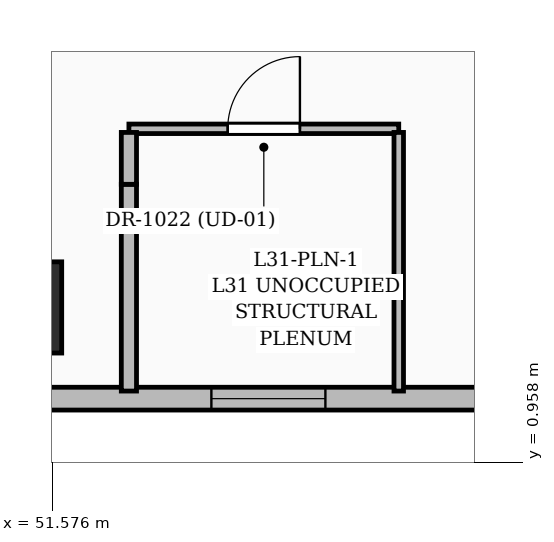
"""IFC4 building model, lengths in metres.
Left out: names, types, materials, properties, quantities, classifications, styles, units other than length and angle.
Written with IfcOpenShell. Run it as: python <this file> out.ifc"""

import sys

from ifc_helpers import new_model, si_unit, direction, frame, frame_2d, origin, origin_2d, place, context, subcontext, project, spatial, rectangle, extrude, element, fill, save


model = new_model("IFC4")
c1 = context("Model", 3, precision=1e-05, world=origin(), true_north=direction((0.0, 1.0)))
c2 = subcontext(c1, "Body", "Model", "MODEL_VIEW")
j1 = project(units=[si_unit("LENGTHUNIT", "METRE"), si_unit("PLANEANGLEUNIT", "RADIAN")], contexts=[c1])
p1 = place(None, origin())
s1 = spatial("IfcSite", under=j1, at=p1, CompositionType="ELEMENT")
p2 = place(p1, origin())
s2 = spatial("IfcBuilding", under=s1, at=p2, CompositionType="ELEMENT")
p3 = place(p2, frame((0.0, 0.0, 124.8)))
s3 = spatial("IfcBuildingStorey", under=s2, at=p3, CompositionType="ELEMENT", Elevation=124.8)
p4 = place(p3, frame((51.096, 3.0, 0.0), z_axis=(0.0, 0.0, 1.0), x_axis=(1.0, 0.0, 0.0)))
e1 = element("IfcColumn", 1, at=p4, inside=s3, PredefinedType="COLUMN", context=c2, shape_type="SweptSolid", body=[
    extrude(rectangle(XDim=1.2, YDim=1.2, at=origin_2d()), origin(), (0.0, 0.0, 1.0), 3.6),
])
p5 = place(p3, frame((56.73, 12.137, 0.0), z_axis=(0.0, 0.0, 1.0), x_axis=(0.506362293691, -0.86232083793, 0.0)))
e2 = element("IfcWall", 2, at=p5, inside=s3, PredefinedType="SOLIDWALL", context=c2, shape_type="SweptSolid", body=[
    extrude(rectangle(XDim=8.127, YDim=0.3, at=frame_2d((4.064, 0.0))), origin(), (0.0, 0.0, 1.0), 3.35),
])
p6 = place(p5, frame((2.925, 0.0, 0.8)))
e3 = element("IfcOpeningElement", 3, at=p6, cuts=e2, PredefinedType="OPENING", context=c2, shape_type="SweptSolid", body=[
    extrude(rectangle(XDim=1.2, YDim=1.8, at=frame_2d((0.6, 0.9))), frame((0.0, 0.16, 0.0), z_axis=(0.0, -1.0, 0.0), x_axis=(1.0, 0.0, 0.0)), (0.0, 0.0, 1.0), 0.32),
])
p7 = place(p3, frame((58.345, 1.8, 0.0), z_axis=(0.0, 0.0, 1.0), x_axis=(-1.0, 0.0, 0.0)))
e4 = element("IfcWall", 4, at=p7, inside=s3, PredefinedType="SOLIDWALL", context=c2, shape_type="SweptSolid", body=[
    extrude(rectangle(XDim=7.604, YDim=0.3, at=frame_2d((3.802, 0.0))), origin(), (0.0, 0.0, 1.0), 3.35),
])
p8 = place(p7, frame((3.18, 0.0, 0.6)))
e5 = element("IfcOpeningElement", 5, at=p8, cuts=e4, PredefinedType="OPENING", context=c2, shape_type="SweptSolid", body=[
    extrude(rectangle(XDim=1.5, YDim=2.1, at=frame_2d((0.75, 1.05))), frame((0.0, 0.16, 0.0), z_axis=(0.0, -1.0, 0.0), x_axis=(1.0, 0.0, 0.0)), (0.0, 0.0, 1.0), 0.32),
])
p9 = place(p3, frame((52.58, 5.35, 0.0), z_axis=(0.0, 0.0, 1.0), x_axis=(1.0, 0.0, 0.0)))
e6 = element("IfcWall", 6, at=p9, inside=s3, PredefinedType="PARTITIONING", context=c2, shape_type="SweptSolid", body=[
    extrude(rectangle(XDim=3.55, YDim=0.125, at=frame_2d((1.775, 0.0))), origin(), (0.0, 0.0, 1.0), 2.57),
])
p10 = place(p9, frame((1.3, 0.0, 0.0)))
e7 = element("IfcOpeningElement", 7, at=p10, cuts=e6, PredefinedType="OPENING", context=c2, shape_type="SweptSolid", body=[
    extrude(rectangle(XDim=0.95, YDim=2.2, at=frame_2d((0.475, 1.1))), frame((0.0, 0.072, 0.0), z_axis=(0.0, -1.0, 0.0), x_axis=(1.0, 0.0, 0.0)), (0.0, 0.0, 1.0), 0.145),
])
p11 = place(p3, frame((56.13, 1.9, 0.0), z_axis=(0.0, 0.0, 1.0), x_axis=(0.0, 1.0, 0.0)))
e8 = element("IfcWall", 8, at=p11, inside=s3, PredefinedType="PARTITIONING", context=c2, shape_type="SweptSolid", body=[
    extrude(rectangle(XDim=3.403, YDim=0.125, at=frame_2d((1.701, 0.0))), origin(), (0.0, 0.0, 1.0), 3.35),
])
p12 = place(p3, frame((52.58, 4.62, 0.0), z_axis=(0.0, 0.0, 1.0), x_axis=(0.0, -1.0, 0.0)))
e9 = element("IfcWall", 9, at=p12, inside=s3, PredefinedType="PARTITIONING", context=c2, shape_type="SweptSolid", body=[
    extrude(rectangle(XDim=2.72, YDim=0.2, at=frame_2d((1.36, 0.0))), origin(), (0.0, 0.0, 1.0), 3.35),
])
p13 = place(p3, frame((52.58, 5.302, 0.0), z_axis=(0.0, 0.0, 1.0), x_axis=(0.0, -1.0, 0.0)))
e10 = element("IfcWall", 10, at=p13, inside=s3, PredefinedType="PARTITIONING", context=c2, shape_type="SweptSolid", body=[
    extrude(rectangle(XDim=0.682, YDim=0.2, at=frame_2d((0.341, 0.0))), origin(), (0.0, 0.0, 1.0), 2.57),
])
p14 = place(p8, origin())
e11 = element("IfcWindow", 11, at=p14, inside=s3, PartitioningType="SINGLE_PANEL", PredefinedType="WINDOW", context=c2, shape_type="SweptSolid", body=[
    extrude(rectangle(XDim=1.5, YDim=2.1, at=frame_2d((0.75, 1.05))), frame((0.0, 0.03, 0.0), z_axis=(0.0, -1.0, 0.0), x_axis=(1.0, 0.0, 0.0)), (0.0, 0.0, 1.0), 0.06),
])
fill(e5, e11)
p15 = place(p10, origin())
e12 = element("IfcDoor", 12, at=p15, inside=s3, OperationType="SINGLE_SWING_RIGHT", PredefinedType="DOOR", context=c2, shape_type="SweptSolid", body=[
    extrude(rectangle(XDim=0.95, YDim=2.2, at=frame_2d((0.475, 1.1))), frame((0.0, 0.025, 0.0), z_axis=(0.0, -1.0, 0.0), x_axis=(1.0, 0.0, 0.0)), (0.0, 0.0, 1.0), 0.05),
])
fill(e7, e12)
save(model, sys.argv[1])
